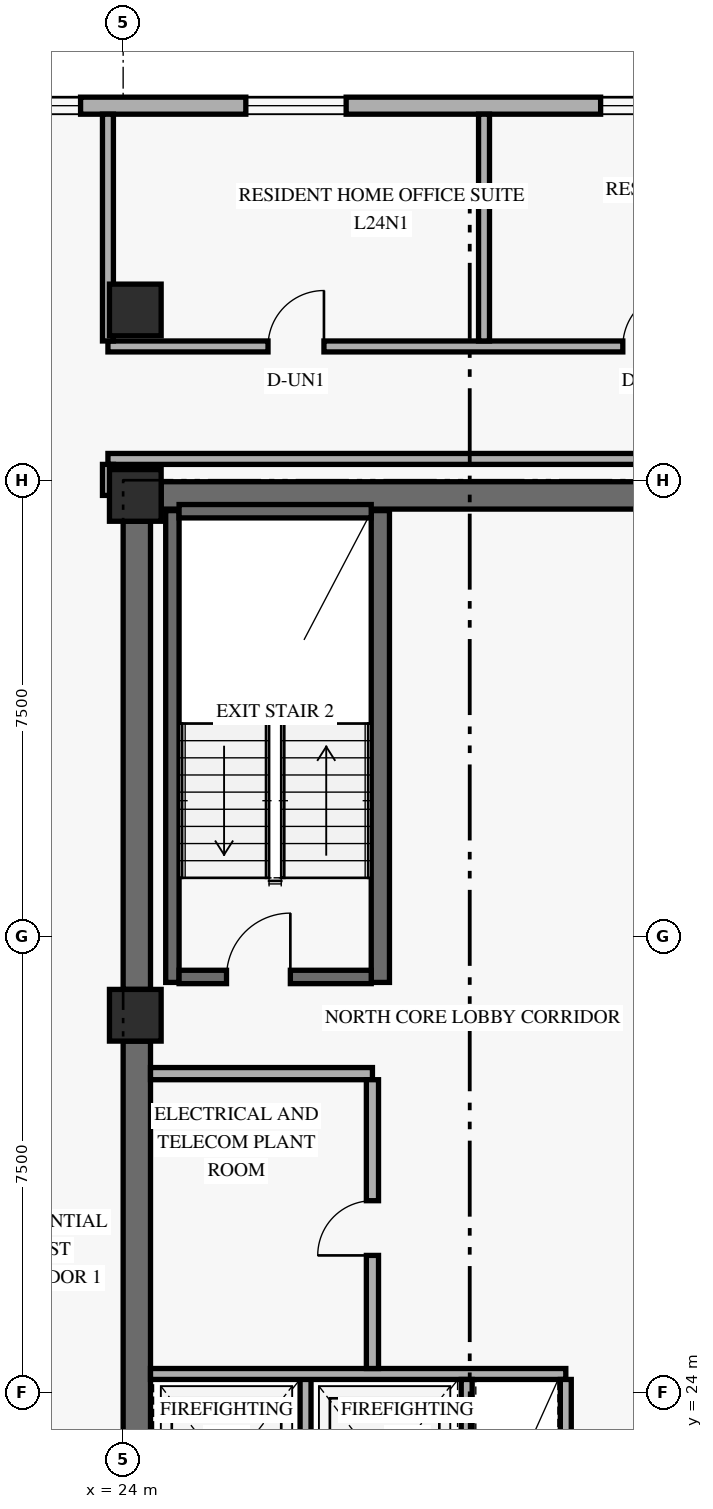
"""IFC4 building model, lengths in metres.
Left out: names, types, materials, properties, quantities, classifications, styles, units other than length and angle.
Written with IfcOpenShell. Run it as: python <this file> out.ifc"""

import sys

from ifc_helpers import new_model, si_unit, direction, frame, frame_2d, origin, origin_2d, place, context, subcontext, project, spatial, rectangle, extrude, element, fill, save


model = new_model("IFC4")
c1 = context("Model", 3, precision=1e-05, world=origin(), true_north=direction((0.0, 1.0)))
c2 = subcontext(c1, "Body", "Model", "MODEL_VIEW")
j1 = project(units=[si_unit("LENGTHUNIT", "METRE"), si_unit("PLANEANGLEUNIT", "RADIAN")], contexts=[c1])
p1 = place(None, origin())
s1 = spatial("IfcSite", under=j1, at=p1, CompositionType="ELEMENT")
p2 = place(p1, origin())
s2 = spatial("IfcBuilding", under=s1, at=p2, CompositionType="ELEMENT")
p3 = place(p2, frame((0.0, 0.0, 94.8)))
s3 = spatial("IfcBuildingStorey", under=s2, at=p3, CompositionType="ELEMENT", Elevation=94.8)
p4 = place(p3, frame((24.225, 17.975, 0.0), z_axis=(0.0, 0.0, 1.0), x_axis=(0.0, 1.0, 0.0)))
e1 = element("IfcWall", 1, at=p4, inside=s3, PredefinedType="SHEAR", context=c2, shape_type="SweptSolid", body=[
    extrude(rectangle(XDim=11.8, YDim=0.45, at=frame_2d((5.9, 0.0))), origin(), (0.0, 0.0, 1.0), 2.739),
])
p5 = place(p3, frame((24.225, 30.625, 0.0), z_axis=(0.0, 0.0, 1.0), x_axis=(0.0, 1.0, 0.0)))
e2 = element("IfcWall", 2, at=p5, inside=s3, PredefinedType="SHEAR", context=c2, shape_type="SweptSolid", body=[
    extrude(rectangle(XDim=7.7, YDim=0.45, at=frame_2d((3.85, 0.0))), origin(), (0.0, 0.0, 1.0), 2.739),
])
p6 = place(p3, frame((24.625, 38.75, 0.0), z_axis=(0.0, 0.0, 1.0), x_axis=(1.0, 0.0, 0.0)))
e3 = element("IfcWall", 3, at=p6, inside=s3, PredefinedType="SHEAR", context=c2, shape_type="SweptSolid", body=[
    extrude(rectangle(XDim=10.15, YDim=0.45, at=frame_2d((5.075, 0.0))), origin(), (0.0, 0.0, 1.0), 3.35),
])
p7 = place(p3, frame((24.81, 30.74, 0.0), z_axis=(0.0, 0.0, 1.0), x_axis=(0.0, 1.0, 0.0)))
e4 = element("IfcWall", 4, at=p7, inside=s3, PredefinedType="SHEAR", context=c2, shape_type="SweptSolid", body=[
    extrude(rectangle(XDim=7.76, YDim=0.22, at=frame_2d((3.88, 0.0))), origin(), (0.0, 0.0, 1.0), 3.35),
])
p8 = place(p3, frame((28.23, 30.74, 0.0), z_axis=(0.0, 0.0, 1.0), x_axis=(0.0, 1.0, 0.0)))
e5 = element("IfcWall", 5, at=p8, inside=s3, PredefinedType="SHEAR", context=c2, shape_type="SweptSolid", body=[
    extrude(rectangle(XDim=7.76, YDim=0.3, at=frame_2d((3.88, 0.0))), origin(), (0.0, 0.0, 1.0), 3.35),
])
p9 = place(p3, frame((24.92, 30.83, 0.0), z_axis=(0.0, 0.0, 1.0), x_axis=(1.0, 0.0, 0.0)))
e6 = element("IfcWall", 6, at=p9, inside=s3, PredefinedType="SHEAR", context=c2, shape_type="SweptSolid", body=[
    extrude(rectangle(XDim=3.16, YDim=0.22, at=frame_2d((1.58, 0.0))), origin(), (0.0, 0.0, 1.0), 3.35),
])
p10 = place(p9, frame((0.78, 0.0, 0.0)))
e7 = element("IfcOpeningElement", 7, at=p10, cuts=e6, PredefinedType="OPENING", context=c2, shape_type="SweptSolid", body=[
    extrude(rectangle(XDim=1.05, YDim=2.15, at=frame_2d((0.525, 1.075))), frame((0.0, 0.12, 0.0), z_axis=(0.0, -1.0, 0.0), x_axis=(1.0, 0.0, 0.0)), (0.0, 0.0, 1.0), 0.24),
])
p11 = place(p3, frame((24.92, 38.49, 0.0), z_axis=(0.0, 0.0, 1.0), x_axis=(1.0, 0.0, 0.0)))
e8 = element("IfcWall", 8, at=p11, inside=s3, PredefinedType="SHEAR", context=c2, shape_type="SweptSolid", body=[
    extrude(rectangle(XDim=3.16, YDim=0.22, at=frame_2d((1.58, 0.0))), origin(), (0.0, 0.0, 1.0), 3.35),
])
for number, where, z_axis, x_axis in (
    (9, (24.2, 30.2, 0.0), (0.0, 0.0, 1.0), (1.0, 0.0, 0.0)),
    (10, (24.2, 38.75, 0.0), (0.0, 0.0, 1.0), (1.0, 0.0, 0.0)),
    (11, (24.2, 41.8, 0.0), (0.0, 0.0, 1.0), (1.0, 0.0, 0.0)),
):
    element("IfcColumn", number, at=place(p3, frame(where, z_axis=z_axis, x_axis=x_axis)), inside=s3, PredefinedType="COLUMN", context=c2, shape_type="SweptSolid", body=[
        extrude(rectangle(XDim=0.85, YDim=0.85, at=origin_2d()), origin(), (0.0, 0.0, 1.0), 3.6),
    ])
p12 = place(p3, frame((49.98, 45.16, 0.0), z_axis=(0.0, 0.0, 1.0), x_axis=(-1.0, 0.0, 0.0)))
e12 = element("IfcWall", 12, at=p12, inside=s3, PredefinedType="SOLIDWALL", context=c2, shape_type="SweptSolid", body=[
    extrude(rectangle(XDim=36.56, YDim=0.28, at=frame_2d((18.28, 0.0))), origin(), (0.0, 0.0, 1.0), 3.35),
])
p13 = place(p12, frame((31.62, 0.0, 0.85)))
e13 = element("IfcOpeningElement", 13, at=p13, cuts=e12, PredefinedType="OPENING", context=c2, shape_type="SweptSolid", body=[
    extrude(rectangle(XDim=1.65, YDim=1.6, at=frame_2d((0.825, 0.8))), frame((0.0, 0.15, 0.0), z_axis=(0.0, -1.0, 0.0), x_axis=(1.0, 0.0, 0.0)), (0.0, 0.0, 1.0), 0.3),
])
p14 = place(p12, frame((26.68, 0.0, 0.85)))
e14 = element("IfcOpeningElement", 14, at=p14, cuts=e12, PredefinedType="OPENING", context=c2, shape_type="SweptSolid", body=[
    extrude(rectangle(XDim=1.2, YDim=1.5, at=frame_2d((0.6, 0.75))), frame((0.0, 0.15, 0.0), z_axis=(0.0, -1.0, 0.0), x_axis=(1.0, 0.0, 0.0)), (0.0, 0.0, 1.0), 0.3),
])
p15 = place(p12, frame((22.312, 0.0, 0.85)))
e15 = element("IfcOpeningElement", 15, at=p15, cuts=e12, PredefinedType="OPENING", context=c2, shape_type="SweptSolid", body=[
    extrude(rectangle(XDim=1.65, YDim=1.6, at=frame_2d((0.825, 0.8))), frame((0.0, 0.15, 0.0), z_axis=(0.0, -1.0, 0.0), x_axis=(1.0, 0.0, 0.0)), (0.0, 0.0, 1.0), 0.3),
])
p16 = place(p12, frame((16.477, 0.0, 0.85)))
e16 = element("IfcOpeningElement", 16, at=p16, cuts=e12, PredefinedType="OPENING", context=c2, shape_type="SweptSolid", body=[
    extrude(rectangle(XDim=1.65, YDim=1.6, at=frame_2d((0.825, 0.8))), frame((0.0, 0.15, 0.0), z_axis=(0.0, -1.0, 0.0), x_axis=(1.0, 0.0, 0.0)), (0.0, 0.0, 1.0), 0.3),
])
p17 = place(p12, frame((12.895, 0.0, 0.85)))
e17 = element("IfcOpeningElement", 17, at=p17, cuts=e12, PredefinedType="OPENING", context=c2, shape_type="SweptSolid", body=[
    extrude(rectangle(XDim=1.2, YDim=1.5, at=frame_2d((0.6, 0.75))), frame((0.0, 0.15, 0.0), z_axis=(0.0, -1.0, 0.0), x_axis=(1.0, 0.0, 0.0)), (0.0, 0.0, 1.0), 0.3),
])
p18 = place(p12, frame((8.092, 0.0, 0.85)))
e18 = element("IfcOpeningElement", 18, at=p18, cuts=e12, PredefinedType="OPENING", context=c2, shape_type="SweptSolid", body=[
    extrude(rectangle(XDim=1.65, YDim=1.6, at=frame_2d((0.825, 0.8))), frame((0.0, 0.15, 0.0), z_axis=(0.0, -1.0, 0.0), x_axis=(1.0, 0.0, 0.0)), (0.0, 0.0, 1.0), 0.3),
])
p19 = place(p12, frame((1.877, 0.0, 0.85)))
e19 = element("IfcOpeningElement", 19, at=p19, cuts=e12, PredefinedType="OPENING", context=c2, shape_type="SweptSolid", body=[
    extrude(rectangle(XDim=1.65, YDim=1.6, at=frame_2d((0.825, 0.8))), frame((0.0, 0.15, 0.0), z_axis=(0.0, -1.0, 0.0), x_axis=(1.0, 0.0, 0.0)), (0.0, 0.0, 1.0), 0.3),
])
p20 = place(p3, frame((27.0, 21.19, 0.0), z_axis=(0.0, 0.0, 1.0), x_axis=(0.0, 1.0, 0.0)))
e20 = element("IfcWall", 20, at=p20, inside=s3, PredefinedType="STANDARD", context=c2, shape_type="SweptSolid", body=[
    extrude(rectangle(XDim=3.11, YDim=0.18, at=frame_2d((1.555, 0.0))), origin(), (0.0, 0.0, 1.0), 3.35),
])
p21 = place(p3, frame((24.45, 24.3, 0.0), z_axis=(0.0, 0.0, 1.0), x_axis=(1.0, 0.0, 0.0)))
e21 = element("IfcWall", 21, at=p21, inside=s3, PredefinedType="STANDARD", context=c2, shape_type="SweptSolid", body=[
    extrude(rectangle(XDim=6.83, YDim=0.18, at=frame_2d((3.415, 0.0))), origin(), (0.0, 0.0, 1.0), 3.35),
])
for number, where, z_axis, x_axis in (
    (22, (29.65, 21.19, 0.0), (0.0, 0.0, 1.0), (0.0, 1.0, 0.0)),
    (23, (31.28, 21.19, 0.0), (0.0, 0.0, 1.0), (0.0, 1.0, 0.0)),
):
    element("IfcWall", number, at=place(p3, frame(where, z_axis=z_axis, x_axis=x_axis)), inside=s3, PredefinedType="STANDARD", context=c2, shape_type="SweptSolid", body=[
        extrude(rectangle(XDim=3.02, YDim=0.18, at=frame_2d((1.51, 0.0))), origin(), (0.0, 0.0, 1.0), 3.35),
    ])
p22 = place(p3, frame((24.45, 29.24, 0.0), z_axis=(0.0, 0.0, 1.0), x_axis=(1.0, 0.0, 0.0)))
e24 = element("IfcWall", 24, at=p22, inside=s3, PredefinedType="STANDARD", context=c2, shape_type="SweptSolid", body=[
    extrude(rectangle(XDim=3.65, YDim=0.2, at=frame_2d((1.825, 0.0))), origin(), (0.0, 0.0, 1.0), 3.35),
])
p23 = place(p3, frame((28.1, 24.39, 0.0), z_axis=(0.0, 0.0, 1.0), x_axis=(0.0, 1.0, 0.0)))
e25 = element("IfcWall", 25, at=p23, inside=s3, PredefinedType="STANDARD", context=c2, shape_type="SweptSolid", body=[
    extrude(rectangle(XDim=4.75, YDim=0.2, at=frame_2d((2.375, 0.0))), origin(), (0.0, 0.0, 1.0), 3.35),
])
p24 = place(p23, frame((1.86, 0.0, 0.0)))
e26 = element("IfcOpeningElement", 26, at=p24, cuts=e25, PredefinedType="OPENING", context=c2, shape_type="SweptSolid", body=[
    extrude(rectangle(XDim=0.9, YDim=2.1, at=frame_2d((0.45, 1.05))), frame((0.0, 0.11, 0.0), z_axis=(0.0, -1.0, 0.0), x_axis=(1.0, 0.0, 0.0)), (0.0, 0.0, 1.0), 0.22),
])
p25 = place(p3, frame((23.75, 41.2, 0.0), z_axis=(0.0, 0.0, 1.0), x_axis=(1.0, 0.0, 0.0)))
e27 = element("IfcWall", 27, at=p25, inside=s3, PredefinedType="STANDARD", context=c2, shape_type="SweptSolid", body=[
    extrude(rectangle(XDim=11.67, YDim=0.18, at=frame_2d((5.835, 0.0))), origin(), (0.0, 0.0, 1.0), 2.721),
])
p26 = place(p25, frame((2.633, 0.0, 0.0)))
e28 = element("IfcOpeningElement", 28, at=p26, cuts=e27, PredefinedType="OPENING", context=c2, shape_type="SweptSolid", body=[
    extrude(rectangle(XDim=0.92, YDim=2.15, at=frame_2d((0.46, 1.075))), frame((0.0, 0.1, 0.0), z_axis=(0.0, -1.0, 0.0), x_axis=(1.0, 0.0, 0.0)), (0.0, 0.0, 1.0), 0.2),
])
p27 = place(p25, frame((8.468, 0.0, 0.0)))
e29 = element("IfcOpeningElement", 29, at=p27, cuts=e27, PredefinedType="OPENING", context=c2, shape_type="SweptSolid", body=[
    extrude(rectangle(XDim=0.92, YDim=2.15, at=frame_2d((0.46, 1.075))), frame((0.0, 0.1, 0.0), z_axis=(0.0, -1.0, 0.0), x_axis=(1.0, 0.0, 0.0)), (0.0, 0.0, 1.0), 0.2),
])
p28 = place(p3, frame((23.75, 39.35, 0.0), z_axis=(0.0, 0.0, 1.0), x_axis=(1.0, 0.0, 0.0)))
e30 = element("IfcWall", 30, at=p28, inside=s3, PredefinedType="STANDARD", context=c2, shape_type="SweptSolid", body=[
    extrude(rectangle(XDim=11.67, YDim=0.18, at=frame_2d((5.835, 0.0))), origin(), (0.0, 0.0, 1.0), 2.721),
])
p29 = place(p3, frame((23.75, 38.75, 0.0), z_axis=(0.0, 0.0, 1.0), x_axis=(0.0, 1.0, 0.0)))
e31 = element("IfcWall", 31, at=p29, inside=s3, PredefinedType="STANDARD", context=c2, shape_type="SweptSolid", body=[
    extrude(rectangle(XDim=0.51, YDim=0.18, at=frame_2d((0.255, 0.0))), origin(), (0.0, 0.0, 1.0), 2.721),
])
for number, where, z_axis, x_axis in (
    (32, (23.75, 41.29, 0.0), (0.0, 0.0, 1.0), (0.0, 1.0, 0.0)),
    (33, (29.935, 41.29, 0.0), (0.0, 0.0, 1.0), (0.0, 1.0, 0.0)),
):
    element("IfcWall", number, at=place(p3, frame(where, z_axis=z_axis, x_axis=x_axis)), inside=s3, PredefinedType="PARTITIONING", context=c2, shape_type="SweptSolid", body=[
        extrude(rectangle(XDim=3.73, YDim=0.18, at=frame_2d((1.865, 0.0))), origin(), (0.0, 0.0, 1.0), 2.799),
    ])
p30 = place(p14, origin())
e34 = element("IfcWindow", 34, at=p30, inside=s3, PartitioningType="SINGLE_PANEL", PredefinedType="WINDOW", context=c2, shape_type="SweptSolid", body=[
    extrude(rectangle(XDim=1.2, YDim=1.5, at=frame_2d((0.6, 0.75))), frame((0.0, 0.03, 0.0), z_axis=(0.0, -1.0, 0.0), x_axis=(1.0, 0.0, 0.0)), (0.0, 0.0, 1.0), 0.06),
])
fill(e14, e34)
p31 = place(p15, origin())
e35 = element("IfcWindow", 35, at=p31, inside=s3, PartitioningType="SINGLE_PANEL", PredefinedType="WINDOW", context=c2, shape_type="SweptSolid", body=[
    extrude(rectangle(XDim=1.65, YDim=1.6, at=frame_2d((0.825, 0.8))), frame((0.0, 0.03, 0.0), z_axis=(0.0, -1.0, 0.0), x_axis=(1.0, 0.0, 0.0)), (0.0, 0.0, 1.0), 0.06),
])
fill(e15, e35)
p32 = place(p16, origin())
e36 = element("IfcWindow", 36, at=p32, inside=s3, PartitioningType="SINGLE_PANEL", PredefinedType="WINDOW", context=c2, shape_type="SweptSolid", body=[
    extrude(rectangle(XDim=1.65, YDim=1.6, at=frame_2d((0.825, 0.8))), frame((0.0, 0.03, 0.0), z_axis=(0.0, -1.0, 0.0), x_axis=(1.0, 0.0, 0.0)), (0.0, 0.0, 1.0), 0.06),
])
fill(e16, e36)
p33 = place(p10, origin())
e37 = element("IfcDoor", 37, at=p33, inside=s3, OperationType="SINGLE_SWING_RIGHT", PredefinedType="DOOR", context=c2, shape_type="SweptSolid", body=[
    extrude(rectangle(XDim=1.05, YDim=2.15, at=frame_2d((0.525, 1.075))), frame((0.0, 0.025, 0.0), z_axis=(0.0, -1.0, 0.0), x_axis=(1.0, 0.0, 0.0)), (0.0, 0.0, 1.0), 0.05),
])
fill(e7, e37)
p34 = place(p24, origin())
e38 = element("IfcDoor", 38, at=p34, inside=s3, OperationType="SINGLE_SWING_LEFT", PredefinedType="DOOR", context=c2, shape_type="SweptSolid", body=[
    extrude(rectangle(XDim=0.9, YDim=2.1, at=frame_2d((0.45, 1.05))), frame((0.0, 0.025, 0.0), z_axis=(0.0, -1.0, 0.0), x_axis=(1.0, 0.0, 0.0)), (0.0, 0.0, 1.0), 0.05),
])
fill(e26, e38)
p35 = place(p26, origin())
e39 = element("IfcDoor", 39, at=p35, inside=s3, OperationType="SINGLE_SWING_RIGHT", PredefinedType="DOOR", context=c2, shape_type="SweptSolid", body=[
    extrude(rectangle(XDim=0.92, YDim=2.15, at=frame_2d((0.46, 1.075))), frame((0.0, 0.025, 0.0), z_axis=(0.0, -1.0, 0.0), x_axis=(1.0, 0.0, 0.0)), (0.0, 0.0, 1.0), 0.05),
])
fill(e28, e39)
p36 = place(p27, origin())
e40 = element("IfcDoor", 40, at=p36, inside=s3, OperationType="SINGLE_SWING_RIGHT", PredefinedType="DOOR", context=c2, shape_type="SweptSolid", body=[
    extrude(rectangle(XDim=0.92, YDim=2.15, at=frame_2d((0.46, 1.075))), frame((0.0, 0.025, 0.0), z_axis=(0.0, -1.0, 0.0), x_axis=(1.0, 0.0, 0.0)), (0.0, 0.0, 1.0), 0.05),
])
fill(e29, e40)
save(model, sys.argv[1])
